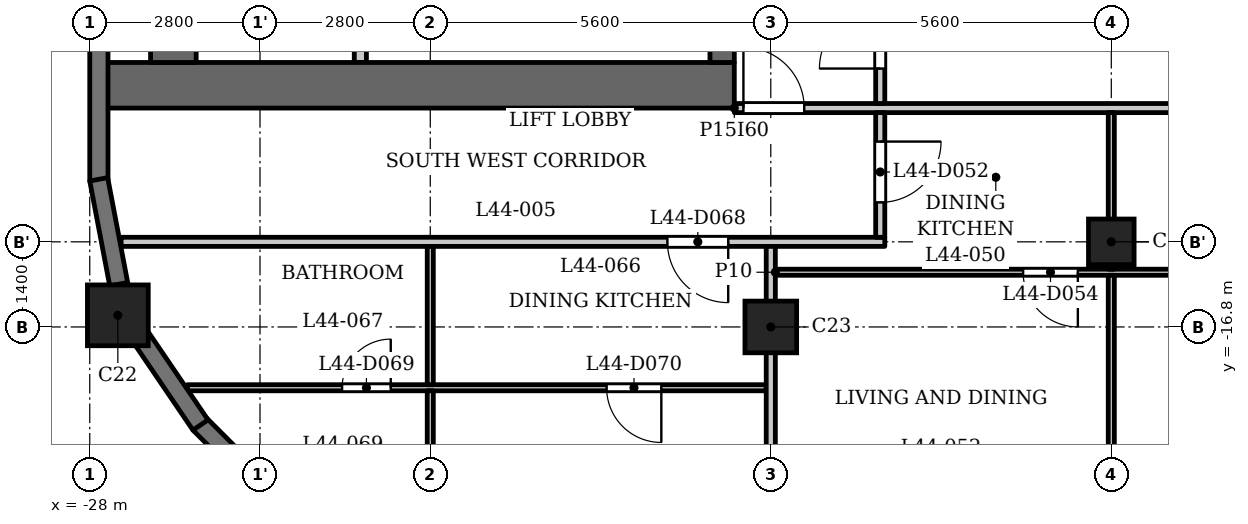
"""IFC4 building model, lengths in metres.
Left out: names, types, materials, properties, quantities, classifications, styles, units other than length and angle.
Written with IfcOpenShell. Run it as: python <this file> out.ifc"""

import sys

from ifc_helpers import new_model, si_unit, direction, frame, frame_2d, origin, origin_2d, place, context, subcontext, project, spatial, rectangle, extrude, element, fill, save


model = new_model("IFC4")
c1 = context("Model", 3, precision=1e-05, world=origin(), true_north=direction((0.0, 1.0)))
c2 = subcontext(c1, "Body", "Model", "MODEL_VIEW")
j1 = project(units=[si_unit("LENGTHUNIT", "METRE"), si_unit("PLANEANGLEUNIT", "RADIAN")], contexts=[c1])
p1 = place(None, origin())
s1 = spatial("IfcSite", under=j1, at=p1, CompositionType="ELEMENT")
p2 = place(p1, origin())
s2 = spatial("IfcBuilding", under=s1, at=p2, CompositionType="ELEMENT")
p3 = place(p2, frame((0.0, 0.0, 171.1)))
s3 = spatial("IfcBuildingStorey", under=s2, at=p3, CompositionType="ELEMENT", Elevation=171.1)
p4 = place(p3, frame((-27.538, -16.609, 0.0), z_axis=(0.0, 0.0, 1.0), x_axis=(1.0, 0.0, 0.0)))
e1 = element("IfcColumn", 1, at=p4, inside=s3, PredefinedType="COLUMN", context=c2, shape_type="SweptSolid", body=[
    extrude(rectangle(XDim=1.0, YDim=1.0, at=origin_2d()), origin(), (0.0, 0.0, 1.0), 3.5),
])
p5 = place(p3, frame((-16.8, -16.8, 0.0), z_axis=(0.0, 0.0, 1.0), x_axis=(1.0, 0.0, 0.0)))
e2 = element("IfcColumn", 2, at=p5, inside=s3, PredefinedType="COLUMN", context=c2, shape_type="SweptSolid", body=[
    extrude(rectangle(XDim=0.85, YDim=0.85, at=origin_2d()), origin(), (0.0, 0.0, 1.0), 3.5),
])
p6 = place(p3, frame((-11.2, -15.4, 0.0), z_axis=(0.0, 0.0, 1.0), x_axis=(1.0, 0.0, 0.0)))
e3 = element("IfcColumn", 3, at=p6, inside=s3, PredefinedType="COLUMN", context=c2, shape_type="SweptSolid", body=[
    extrude(rectangle(XDim=0.75, YDim=0.75, at=origin_2d()), origin(), (0.0, 0.0, 1.0), 3.5),
])
p7 = place(p3, frame((-26.197, -18.391, 0.0), z_axis=(0.0, 0.0, 1.0), x_axis=(0.707061571201, -0.707151988282, 0.0)))
e4 = element("IfcWall", 4, at=p7, inside=s3, PredefinedType="SOLIDWALL", context=c2, shape_type="SweptSolid", body=[
    extrude(rectangle(XDim=2.7, YDim=0.3, at=frame_2d((1.35, 0.0))), origin(), (0.0, 0.0, 1.0), 2.45),
])
p8 = place(p7, frame((0.75, 0.0, 0.6)))
e5 = element("IfcOpeningElement", 5, at=p8, cuts=e4, PredefinedType="OPENING", context=c2, shape_type="SweptSolid", body=[
    extrude(rectangle(XDim=1.2, YDim=1.55, at=frame_2d((0.6, 0.775))), frame((0.0, 0.16, 0.0), z_axis=(0.0, -1.0, 0.0), x_axis=(1.0, 0.0, 0.0)), (0.0, 0.0, 1.0), 0.32),
])
p9 = place(p3, frame((-27.85, -11.7, 0.0), z_axis=(0.0, 0.0, 1.0), x_axis=(0.0, -1.0, 0.0)))
e6 = element("IfcWall", 6, at=p9, inside=s3, PredefinedType="SOLIDWALL", context=c2, shape_type="SweptSolid", body=[
    extrude(rectangle(XDim=2.7, YDim=0.3, at=frame_2d((1.35, 0.0))), origin(), (0.0, 0.0, 1.0), 2.45),
])
for number, where, z_axis, x_axis in (
    (7, (-27.853, -14.372, 0.0), (0.0, 0.0, 1.0), (0.187, -0.982, 0.0)),
    (8, (-27.166, -16.96, 0.0), (0.0, 0.0, 1.0), (0.562, -0.827, 0.0)),
):
    element("IfcWall", number, at=place(p3, frame(where, z_axis=z_axis, x_axis=x_axis)), inside=s3, PredefinedType="SOLIDWALL", context=c2, shape_type="SweptSolid", body=[
        extrude(rectangle(XDim=1.756, YDim=0.3, at=frame_2d((0.878, 0.0))), origin(), (0.0, 0.0, 1.0), 2.45),
    ])
p10 = place(p3, frame((-17.4, -12.825, 0.0), z_axis=(0.0, 0.0, 1.0), x_axis=(-1.0, 0.0, 0.0)))
e9 = element("IfcWall", 9, at=p10, inside=s3, PredefinedType="SHEAR", context=c2, shape_type="SweptSolid", body=[
    extrude(rectangle(XDim=10.4, YDim=0.75, at=frame_2d((5.2, 0.0))), origin(), (0.0, 0.0, 1.0), 3.2),
])
p11 = place(p3, frame((-17.6, -12.45, 0.0), z_axis=(0.0, 0.0, 1.0), x_axis=(0.0, 1.0, 0.0)))
e10 = element("IfcWall", 10, at=p11, inside=s3, PredefinedType="SHEAR", context=c2, shape_type="SweptSolid", body=[
    extrude(rectangle(XDim=24.9, YDim=0.4, at=frame_2d((12.45, 0.0))), origin(), (0.0, 0.0, 1.0), 3.2),
])
p12 = place(p11, frame((8.65, 0.0, 0.0)))
e11 = element("IfcOpeningElement", 11, at=p12, cuts=e10, PredefinedType="OPENING", context=c2, shape_type="SweptSolid", body=[
    extrude(rectangle(XDim=0.9, YDim=2.1, at=frame_2d((0.45, 1.05))), frame((0.0, 0.21, 0.0), z_axis=(0.0, -1.0, 0.0), x_axis=(1.0, 0.0, 0.0)), (0.0, 0.0, 1.0), 0.42),
])
p13 = place(p11, frame((15.6, 0.0, 0.0)))
e12 = element("IfcOpeningElement", 12, at=p13, cuts=e10, PredefinedType="OPENING", context=c2, shape_type="SweptSolid", body=[
    extrude(rectangle(XDim=1.1, YDim=2.1, at=frame_2d((0.55, 1.05))), frame((0.0, 0.21, 0.0), z_axis=(0.0, -1.0, 0.0), x_axis=(1.0, 0.0, 0.0)), (0.0, 0.0, 1.0), 0.42),
])
p14 = place(p11, frame((18.0, 0.0, 0.0)))
e13 = element("IfcOpeningElement", 13, at=p14, cuts=e10, PredefinedType="OPENING", context=c2, shape_type="SweptSolid", body=[
    extrude(rectangle(XDim=1.1, YDim=2.1, at=frame_2d((0.55, 1.05))), frame((0.0, 0.21, 0.0), z_axis=(0.0, -1.0, 0.0), x_axis=(1.0, 0.0, 0.0)), (0.0, 0.0, 1.0), 0.42),
])
p15 = place(p11, frame((23.025, 0.0, 0.0)))
e14 = element("IfcOpeningElement", 14, at=p15, cuts=e10, PredefinedType="OPENING", context=c2, shape_type="SweptSolid", body=[
    extrude(rectangle(XDim=1.1, YDim=2.1, at=frame_2d((0.55, 1.05))), frame((0.0, 0.21, 0.0), z_axis=(0.0, -1.0, 0.0), x_axis=(1.0, 0.0, 0.0)), (0.0, 0.0, 1.0), 0.42),
])
p16 = place(p11, frame((0.775, 0.0, 0.0)))
e15 = element("IfcOpeningElement", 15, at=p16, cuts=e10, PredefinedType="OPENING", context=c2, shape_type="SweptSolid", body=[
    extrude(rectangle(XDim=1.1, YDim=2.1, at=frame_2d((0.55, 1.05))), frame((0.0, 0.21, 0.0), z_axis=(0.0, -1.0, 0.0), x_axis=(1.0, 0.0, 0.0)), (0.0, 0.0, 1.0), 0.42),
])
p17 = place(p11, frame((12.925, 0.0, 0.0)))
e16 = element("IfcOpeningElement", 16, at=p17, cuts=e10, PredefinedType="OPENING", context=c2, shape_type="SweptSolid", body=[
    extrude(rectangle(XDim=1.8, YDim=2.1, at=frame_2d((0.9, 1.05))), frame((0.0, 0.21, 0.0), z_axis=(0.0, -1.0, 0.0), x_axis=(1.0, 0.0, 0.0)), (0.0, 0.0, 1.0), 0.42),
])
p18 = place(p3, frame((-26.625, -12.45, 0.0), z_axis=(0.0, 0.0, 1.0), x_axis=(0.0, 1.0, 0.0)))
e17 = element("IfcWall", 17, at=p18, inside=s3, PredefinedType="SHEAR", context=c2, shape_type="SweptSolid", body=[
    extrude(rectangle(XDim=24.9, YDim=0.75, at=frame_2d((12.45, 0.0))), origin(), (0.0, 0.0, 1.0), 3.2),
])
p19 = place(p3, frame((-23.55, -12.45, 0.0), z_axis=(0.0, 0.0, 1.0), x_axis=(0.0, 1.0, 0.0)))
e18 = element("IfcWall", 18, at=p19, inside=s3, PredefinedType="PARTITIONING", context=c2, shape_type="SweptSolid", body=[
    extrude(rectangle(XDim=2.65, YDim=0.2, at=frame_2d((1.325, 0.0))), origin(), (0.0, 0.0, 1.0), 3.2),
])
p20 = place(p19, frame((0.875, 0.0, 0.0)))
e19 = element("IfcOpeningElement", 19, at=p20, cuts=e18, PredefinedType="OPENING", context=c2, shape_type="SweptSolid", body=[
    extrude(rectangle(XDim=0.9, YDim=2.1, at=frame_2d((0.45, 1.05))), frame((0.0, 0.11, 0.0), z_axis=(0.0, -1.0, 0.0), x_axis=(1.0, 0.0, 0.0)), (0.0, 0.0, 1.0), 0.22),
])
p21 = place(p3, frame((-26.394, -17.8, 0.0), z_axis=(0.0, 0.0, 1.0), x_axis=(1.0, 0.0, 0.0)))
e20 = element("IfcWall", 20, at=p21, inside=s3, PredefinedType="PARTITIONING", context=c2, shape_type="SweptSolid", body=[
    extrude(rectangle(XDim=9.519, YDim=0.1, at=frame_2d((4.76, 0.0))), origin(), (0.0, 0.0, 1.0), 3.2),
])
p22 = place(p21, frame((2.544, 0.0, 0.0)))
e21 = element("IfcOpeningElement", 21, at=p22, cuts=e20, PredefinedType="OPENING", context=c2, shape_type="SweptSolid", body=[
    extrude(rectangle(XDim=0.8, YDim=2.1, at=frame_2d((0.4, 1.05))), frame((0.0, 0.06, 0.0), z_axis=(0.0, -1.0, 0.0), x_axis=(1.0, 0.0, 0.0)), (0.0, 0.0, 1.0), 0.12),
])
p23 = place(p21, frame((6.894, 0.0, 0.0)))
e22 = element("IfcOpeningElement", 22, at=p23, cuts=e20, PredefinedType="OPENING", context=c2, shape_type="SweptSolid", body=[
    extrude(rectangle(XDim=0.9, YDim=2.1, at=frame_2d((0.45, 1.05))), frame((0.0, 0.06, 0.0), z_axis=(0.0, -1.0, 0.0), x_axis=(1.0, 0.0, 0.0)), (0.0, 0.0, 1.0), 0.12),
])
p24 = place(p3, frame((-16.725, -15.9, 0.0), z_axis=(0.0, 0.0, 1.0), x_axis=(1.0, 0.0, 0.0)))
e23 = element("IfcWall", 23, at=p24, inside=s3, PredefinedType="PARTITIONING", context=c2, shape_type="SweptSolid", body=[
    extrude(rectangle(XDim=33.45, YDim=0.1, at=frame_2d((16.725, 0.0))), origin(), (0.0, 0.0, 1.0), 3.2),
])
p25 = place(p24, frame((9.675, 0.0, 0.0)))
e24 = element("IfcOpeningElement", 24, at=p25, cuts=e23, PredefinedType="OPENING", context=c2, shape_type="SweptSolid", body=[
    extrude(rectangle(XDim=0.8, YDim=2.1, at=frame_2d((0.4, 1.05))), frame((0.0, 0.06, 0.0), z_axis=(0.0, -1.0, 0.0), x_axis=(1.0, 0.0, 0.0)), (0.0, 0.0, 1.0), 0.12),
])
p26 = place(p24, frame((4.075, 0.0, 0.0)))
e25 = element("IfcOpeningElement", 25, at=p26, cuts=e23, PredefinedType="OPENING", context=c2, shape_type="SweptSolid", body=[
    extrude(rectangle(XDim=0.9, YDim=2.1, at=frame_2d((0.45, 1.05))), frame((0.0, 0.06, 0.0), z_axis=(0.0, -1.0, 0.0), x_axis=(1.0, 0.0, 0.0)), (0.0, 0.0, 1.0), 0.12),
])
p27 = place(p24, frame((20.875, 0.0, 0.0)))
e26 = element("IfcOpeningElement", 26, at=p27, cuts=e23, PredefinedType="OPENING", context=c2, shape_type="SweptSolid", body=[
    extrude(rectangle(XDim=0.8, YDim=2.1, at=frame_2d((0.4, 1.05))), frame((0.0, 0.06, 0.0), z_axis=(0.0, -1.0, 0.0), x_axis=(1.0, 0.0, 0.0)), (0.0, 0.0, 1.0), 0.12),
])
p28 = place(p24, frame((15.275, 0.0, 0.0)))
e27 = element("IfcOpeningElement", 27, at=p28, cuts=e23, PredefinedType="OPENING", context=c2, shape_type="SweptSolid", body=[
    extrude(rectangle(XDim=0.9, YDim=2.1, at=frame_2d((0.45, 1.05))), frame((0.0, 0.06, 0.0), z_axis=(0.0, -1.0, 0.0), x_axis=(1.0, 0.0, 0.0)), (0.0, 0.0, 1.0), 0.12),
])
p29 = place(p24, frame((30.825, 0.0, 0.0)))
e28 = element("IfcOpeningElement", 28, at=p29, cuts=e23, PredefinedType="OPENING", context=c2, shape_type="SweptSolid", body=[
    extrude(rectangle(XDim=0.8, YDim=2.1, at=frame_2d((0.4, 1.05))), frame((0.0, 0.06, 0.0), z_axis=(0.0, -1.0, 0.0), x_axis=(1.0, 0.0, 0.0)), (0.0, 0.0, 1.0), 0.12),
])
p30 = place(p24, frame((26.475, 0.0, 0.0)))
e29 = element("IfcOpeningElement", 29, at=p30, cuts=e23, PredefinedType="OPENING", context=c2, shape_type="SweptSolid", body=[
    extrude(rectangle(XDim=0.9, YDim=2.1, at=frame_2d((0.45, 1.05))), frame((0.0, 0.06, 0.0), z_axis=(0.0, -1.0, 0.0), x_axis=(1.0, 0.0, 0.0)), (0.0, 0.0, 1.0), 0.12),
])
p31 = place(p3, frame((-27.484, -15.4, 0.0), z_axis=(0.0, 0.0, 1.0), x_axis=(1.0, 0.0, 0.0)))
e30 = element("IfcWall", 30, at=p31, inside=s3, PredefinedType="PARTITIONING", context=c2, shape_type="SweptSolid", body=[
    extrude(rectangle(XDim=12.559, YDim=0.15, at=frame_2d((6.279, 0.0))), origin(), (0.0, 0.0, 1.0), 3.2),
])
p32 = place(p31, frame((8.984, 0.0, 0.0)))
e31 = element("IfcOpeningElement", 31, at=p32, cuts=e30, PredefinedType="OPENING", context=c2, shape_type="SweptSolid", body=[
    extrude(rectangle(XDim=1.0, YDim=2.1, at=frame_2d((0.5, 1.05))), frame((0.0, 0.085, 0.0), z_axis=(0.0, -1.0, 0.0), x_axis=(1.0, 0.0, 0.0)), (0.0, 0.0, 1.0), 0.17),
])
p33 = place(p3, frame((-17.4, -13.2, 0.0), z_axis=(0.0, 0.0, 1.0), x_axis=(1.0, 0.0, 0.0)))
e32 = element("IfcWall", 32, at=p33, inside=s3, PredefinedType="PARTITIONING", context=c2, shape_type="SweptSolid", body=[
    extrude(rectangle(XDim=34.8, YDim=0.15, at=frame_2d((17.4, 0.0))), origin(), (0.0, 0.0, 1.0), 3.2),
])
p34 = place(p33, frame((0.15, 0.0, 0.0)))
e33 = element("IfcOpeningElement", 33, at=p34, cuts=e32, PredefinedType="OPENING", context=c2, shape_type="SweptSolid", body=[
    extrude(rectangle(XDim=1.0, YDim=2.1, at=frame_2d((0.5, 1.05))), frame((0.0, 0.085, 0.0), z_axis=(0.0, -1.0, 0.0), x_axis=(1.0, 0.0, 0.0)), (0.0, 0.0, 1.0), 0.17),
])
p35 = place(p33, frame((33.55, 0.0, 0.0)))
e34 = element("IfcOpeningElement", 34, at=p35, cuts=e32, PredefinedType="OPENING", context=c2, shape_type="SweptSolid", body=[
    extrude(rectangle(XDim=1.0, YDim=2.1, at=frame_2d((0.5, 1.05))), frame((0.0, 0.085, 0.0), z_axis=(0.0, -1.0, 0.0), x_axis=(1.0, 0.0, 0.0)), (0.0, 0.0, 1.0), 0.17),
])
p36 = place(p33, frame((15.7, 0.0, 0.0)))
e35 = element("IfcOpeningElement", 35, at=p36, cuts=e32, PredefinedType="OPENING", context=c2, shape_type="SweptSolid", body=[
    extrude(rectangle(XDim=1.0, YDim=2.1, at=frame_2d((0.5, 1.05))), frame((0.0, 0.085, 0.0), z_axis=(0.0, -1.0, 0.0), x_axis=(1.0, 0.0, 0.0)), (0.0, 0.0, 1.0), 0.17),
])
p37 = place(p33, frame((26.9, 0.0, 0.0)))
e36 = element("IfcOpeningElement", 36, at=p37, cuts=e32, PredefinedType="OPENING", context=c2, shape_type="SweptSolid", body=[
    extrude(rectangle(XDim=1.0, YDim=2.1, at=frame_2d((0.5, 1.05))), frame((0.0, 0.085, 0.0), z_axis=(0.0, -1.0, 0.0), x_axis=(1.0, 0.0, 0.0)), (0.0, 0.0, 1.0), 0.17),
])
p38 = place(p3, frame((-22.4, -21.72, 0.0), z_axis=(0.0, 0.0, 1.0), x_axis=(0.0, 1.0, 0.0)))
e37 = element("IfcWall", 37, at=p38, inside=s3, PredefinedType="PARTITIONING", context=c2, shape_type="SweptSolid", body=[
    extrude(rectangle(XDim=3.87, YDim=0.1, at=frame_2d((1.935, 0.0))), origin(), (0.0, 0.0, 1.0), 3.2),
])
p39 = place(p38, frame((1.62, 0.0, 0.0)))
e38 = element("IfcOpeningElement", 38, at=p39, cuts=e37, PredefinedType="OPENING", context=c2, shape_type="SweptSolid", body=[
    extrude(rectangle(XDim=0.9, YDim=2.1, at=frame_2d((0.45, 1.05))), frame((0.0, 0.06, 0.0), z_axis=(0.0, -1.0, 0.0), x_axis=(1.0, 0.0, 0.0)), (0.0, 0.0, 1.0), 0.12),
])
p40 = place(p3, frame((-22.4, -17.75, 0.0), z_axis=(0.0, 0.0, 1.0), x_axis=(0.0, 1.0, 0.0)))
e39 = element("IfcWall", 39, at=p40, inside=s3, PredefinedType="PARTITIONING", context=c2, shape_type="SweptSolid", body=[
    extrude(rectangle(XDim=2.275, YDim=0.1, at=frame_2d((1.137, 0.0))), origin(), (0.0, 0.0, 1.0), 3.2),
])
p41 = place(p3, frame((-16.8, -22.88, 0.0), z_axis=(0.0, 0.0, 1.0), x_axis=(0.0, 1.0, 0.0)))
e40 = element("IfcWall", 40, at=p41, inside=s3, PredefinedType="PARTITIONING", context=c2, shape_type="SweptSolid", body=[
    extrude(rectangle(XDim=7.405, YDim=0.15, at=frame_2d((3.702, 0.0))), origin(), (0.0, 0.0, 1.0), 3.2),
])
p42 = place(p3, frame((-15.0, -15.325, 0.0), z_axis=(0.0, 0.0, 1.0), x_axis=(0.0, 1.0, 0.0)))
e41 = element("IfcWall", 41, at=p42, inside=s3, PredefinedType="PARTITIONING", context=c2, shape_type="SweptSolid", body=[
    extrude(rectangle(XDim=2.05, YDim=0.15, at=frame_2d((1.025, 0.0))), origin(), (0.0, 0.0, 1.0), 3.2),
])
p43 = place(p42, frame((0.574, 0.0, 0.0)))
e42 = element("IfcOpeningElement", 42, at=p43, cuts=e41, PredefinedType="OPENING", context=c2, shape_type="SweptSolid", body=[
    extrude(rectangle(XDim=1.0, YDim=2.1, at=frame_2d((0.5, 1.05))), frame((0.0, 0.085, 0.0), z_axis=(0.0, -1.0, 0.0), x_axis=(1.0, 0.0, 0.0)), (0.0, 0.0, 1.0), 0.17),
])
p44 = place(p3, frame((-15.0, -13.125, 0.0), z_axis=(0.0, 0.0, 1.0), x_axis=(0.0, 1.0, 0.0)))
e43 = element("IfcWall", 43, at=p44, inside=s3, PredefinedType="PARTITIONING", context=c2, shape_type="SweptSolid", body=[
    extrude(rectangle(XDim=6.356, YDim=0.15, at=frame_2d((3.178, 0.0))), origin(), (0.0, 0.0, 1.0), 3.2),
])
p45 = place(p44, frame((0.575, 0.0, 0.0)))
e44 = element("IfcOpeningElement", 44, at=p45, cuts=e43, PredefinedType="OPENING", context=c2, shape_type="SweptSolid", body=[
    extrude(rectangle(XDim=1.0, YDim=2.1, at=frame_2d((0.5, 1.05))), frame((0.0, 0.085, 0.0), z_axis=(0.0, -1.0, 0.0), x_axis=(1.0, 0.0, 0.0)), (0.0, 0.0, 1.0), 0.17),
])
p46 = place(p3, frame((-11.2, -22.88, 0.0), z_axis=(0.0, 0.0, 1.0), x_axis=(0.0, 1.0, 0.0)))
e45 = element("IfcWall", 45, at=p46, inside=s3, PredefinedType="PARTITIONING", context=c2, shape_type="SweptSolid", body=[
    extrude(rectangle(XDim=6.93, YDim=0.1, at=frame_2d((3.465, 0.0))), origin(), (0.0, 0.0, 1.0), 3.2),
])
p47 = place(p46, frame((1.22, 0.0, 0.0)))
e46 = element("IfcOpeningElement", 46, at=p47, cuts=e45, PredefinedType="OPENING", context=c2, shape_type="SweptSolid", body=[
    extrude(rectangle(XDim=0.9, YDim=2.1, at=frame_2d((0.45, 1.05))), frame((0.0, 0.06, 0.0), z_axis=(0.0, -1.0, 0.0), x_axis=(1.0, 0.0, 0.0)), (0.0, 0.0, 1.0), 0.12),
])
p48 = place(p3, frame((-11.2, -15.85, 0.0), z_axis=(0.0, 0.0, 1.0), x_axis=(0.0, 1.0, 0.0)))
e47 = element("IfcWall", 47, at=p48, inside=s3, PredefinedType="PARTITIONING", context=c2, shape_type="SweptSolid", body=[
    extrude(rectangle(XDim=2.575, YDim=0.1, at=frame_2d((1.288, 0.0))), origin(), (0.0, 0.0, 1.0), 3.2),
])
p49 = place(p45, origin())
e48 = element("IfcDoor", 48, at=p49, inside=s3, OperationType="SINGLE_SWING_RIGHT", PredefinedType="DOOR", context=c2, shape_type="SweptSolid", body=[
    extrude(rectangle(XDim=1.0, YDim=2.1, at=frame_2d((0.5, 1.05))), frame((0.0, 0.025, 0.0), z_axis=(0.0, -1.0, 0.0), x_axis=(1.0, 0.0, 0.0)), (0.0, 0.0, 1.0), 0.05),
])
fill(e44, e48)
p50 = place(p34, origin())
e49 = element("IfcDoor", 49, at=p50, inside=s3, OperationType="SINGLE_SWING_RIGHT", PredefinedType="DOOR", context=c2, shape_type="SweptSolid", body=[
    extrude(rectangle(XDim=1.0, YDim=2.1, at=frame_2d((0.5, 1.05))), frame((0.0, 0.025, 0.0), z_axis=(0.0, -1.0, 0.0), x_axis=(1.0, 0.0, 0.0)), (0.0, 0.0, 1.0), 0.05),
])
fill(e33, e49)
p51 = place(p43, origin())
e50 = element("IfcDoor", 50, at=p51, inside=s3, OperationType="SINGLE_SWING_RIGHT", PredefinedType="DOOR", context=c2, shape_type="SweptSolid", body=[
    extrude(rectangle(XDim=1.0, YDim=2.1, at=frame_2d((0.5, 1.05))), frame((0.0, 0.025, 0.0), z_axis=(0.0, -1.0, 0.0), x_axis=(1.0, 0.0, 0.0)), (0.0, 0.0, 1.0), 0.05),
])
fill(e42, e50)
p52 = place(p26, origin())
e51 = element("IfcDoor", 51, at=p52, inside=s3, OperationType="SINGLE_SWING_RIGHT", PredefinedType="DOOR", context=c2, shape_type="SweptSolid", body=[
    extrude(rectangle(XDim=0.9, YDim=2.1, at=frame_2d((0.45, 1.05))), frame((0.0, 0.025, 0.0), z_axis=(0.0, -1.0, 0.0), x_axis=(1.0, 0.0, 0.0)), (0.0, 0.0, 1.0), 0.05),
])
fill(e25, e51)
p53 = place(p32, origin())
e52 = element("IfcDoor", 52, at=p53, inside=s3, OperationType="SINGLE_SWING_RIGHT", PredefinedType="DOOR", context=c2, shape_type="SweptSolid", body=[
    extrude(rectangle(XDim=1.0, YDim=2.1, at=frame_2d((0.5, 1.05))), frame((0.0, 0.025, 0.0), z_axis=(0.0, -1.0, 0.0), x_axis=(1.0, 0.0, 0.0)), (0.0, 0.0, 1.0), 0.05),
])
fill(e31, e52)
p54 = place(p22, origin())
e53 = element("IfcDoor", 53, at=p54, inside=s3, OperationType="SINGLE_SWING_LEFT", PredefinedType="DOOR", context=c2, shape_type="SweptSolid", body=[
    extrude(rectangle(XDim=0.8, YDim=2.1, at=frame_2d((0.4, 1.05))), frame((0.0, 0.025, 0.0), z_axis=(0.0, -1.0, 0.0), x_axis=(1.0, 0.0, 0.0)), (0.0, 0.0, 1.0), 0.05),
])
fill(e21, e53)
p55 = place(p23, origin())
e54 = element("IfcDoor", 54, at=p55, inside=s3, OperationType="SINGLE_SWING_RIGHT", PredefinedType="DOOR", context=c2, shape_type="SweptSolid", body=[
    extrude(rectangle(XDim=0.9, YDim=2.1, at=frame_2d((0.45, 1.05))), frame((0.0, 0.025, 0.0), z_axis=(0.0, -1.0, 0.0), x_axis=(1.0, 0.0, 0.0)), (0.0, 0.0, 1.0), 0.05),
])
fill(e22, e54)
save(model, sys.argv[1])
